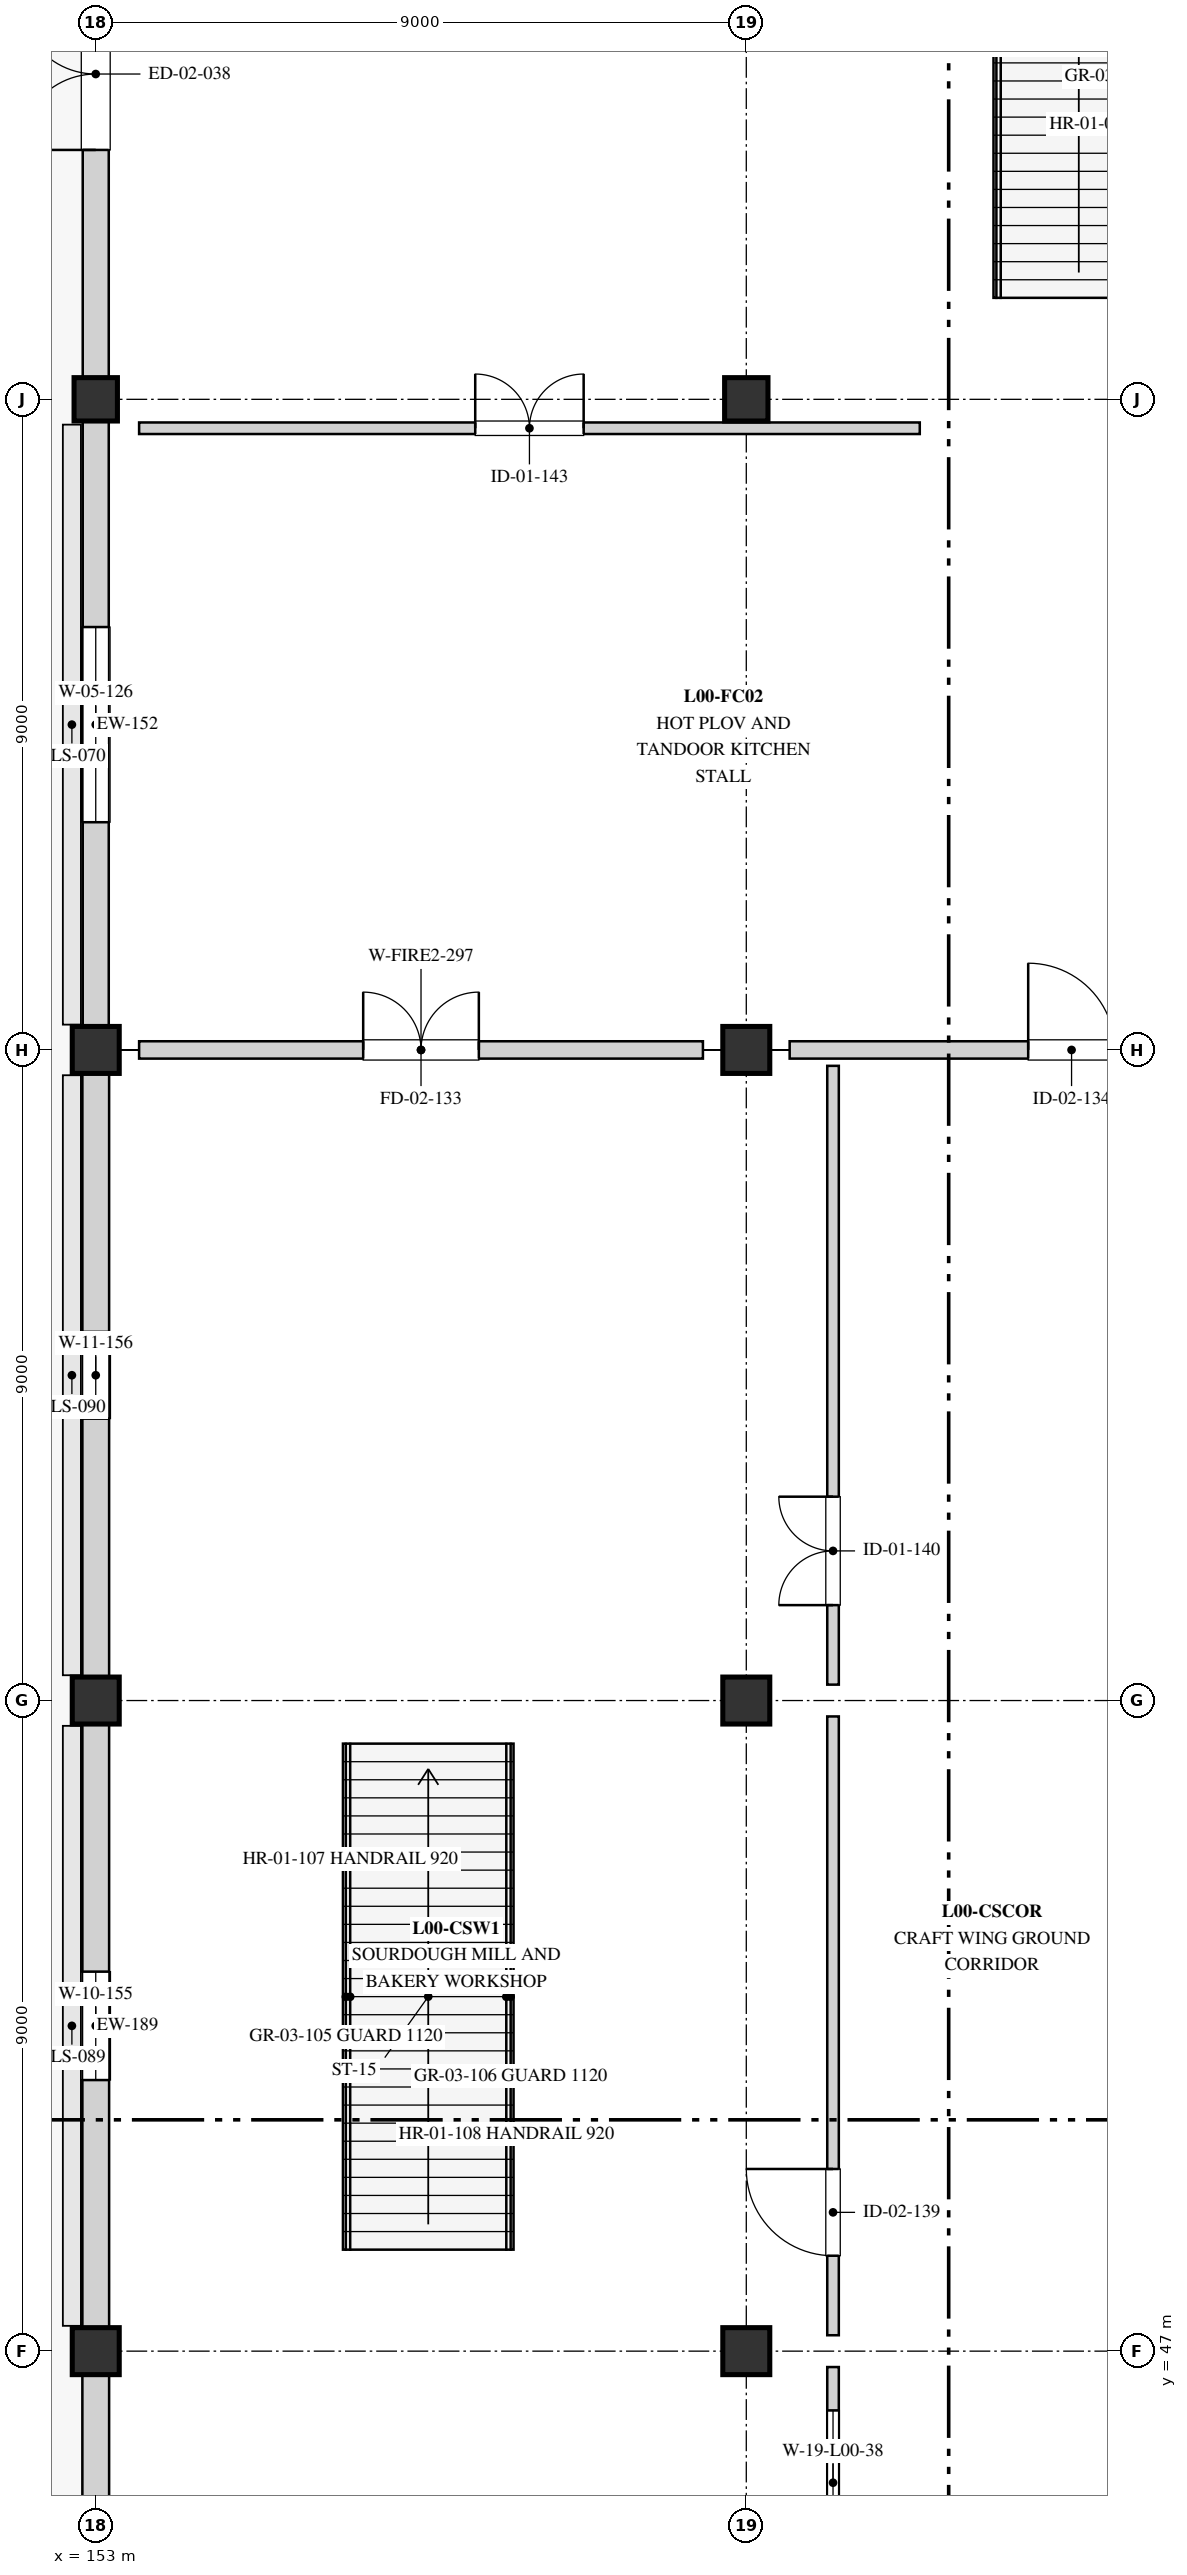
"""IFC4 building model, lengths in metres.
Left out: names, types, materials, properties, quantities, classifications, styles, units other than length and angle.
Written with IfcOpenShell. Run it as: python <this file> out.ifc"""

import sys

from ifc_helpers import new_model, si_unit, direction, frame, frame_2d, origin, origin_2d, place, context, subcontext, project, spatial, rectangle, extrude, element, fill, save


model = new_model("IFC4")
c1 = context("Model", 3, precision=1e-05, world=origin(), true_north=direction((0.0, 1.0)))
c2 = subcontext(c1, "Body", "Model", "MODEL_VIEW")
j1 = project(units=[si_unit("LENGTHUNIT", "METRE"), si_unit("PLANEANGLEUNIT", "RADIAN")], contexts=[c1])
p1 = place(None, origin())
s1 = spatial("IfcSite", under=j1, at=p1, CompositionType="ELEMENT")
p2 = place(p1, origin())
s2 = spatial("IfcBuilding", under=s1, at=p2, CompositionType="ELEMENT")
p3 = place(p2, origin())
s3 = spatial("IfcBuildingStorey", under=s2, at=p3, CompositionType="ELEMENT", Elevation=0.0)
for number, where, z_axis, x_axis in (
    (1, (153.0, 47.0, 0.0), (0.0, 0.0, 1.0), (1.0, 0.0, 0.0)),
    (2, (153.0, 56.0, 0.0), (0.0, 0.0, 1.0), (1.0, 0.0, 0.0)),
    (3, (153.0, 65.0, 0.0), (0.0, 0.0, 1.0), (1.0, 0.0, 0.0)),
):
    element("IfcColumn", number, at=place(p3, frame(where, z_axis=z_axis, x_axis=x_axis)), inside=s3, PredefinedType="COLUMN", context=c2, shape_type="SweptSolid", body=[
        extrude(rectangle(XDim=0.65, YDim=0.65, at=origin_2d()), origin(), (0.0, 0.0, 1.0), 4.5),
    ])
p4 = place(p3, frame((153.0, 74.0, 0.0), z_axis=(0.0, 0.0, 1.0), x_axis=(1.0, 0.0, 0.0)))
e4 = element("IfcColumn", 4, at=p4, inside=s3, PredefinedType="COLUMN", context=c2, shape_type="SweptSolid", body=[
    extrude(rectangle(XDim=0.6, YDim=0.6, at=origin_2d()), origin(), (0.0, 0.0, 1.0), 4.5),
])
for number, where, z_axis, x_axis in (
    (5, (162.0, 47.0, 0.0), (0.0, 0.0, 1.0), (1.0, 0.0, 0.0)),
    (6, (162.0, 56.0, 0.0), (0.0, 0.0, 1.0), (1.0, 0.0, 0.0)),
    (7, (162.0, 65.0, 0.0), (0.0, 0.0, 1.0), (1.0, 0.0, 0.0)),
):
    element("IfcColumn", number, at=place(p3, frame(where, z_axis=z_axis, x_axis=x_axis)), inside=s3, PredefinedType="COLUMN", context=c2, shape_type="SweptSolid", body=[
        extrude(rectangle(XDim=0.65, YDim=0.65, at=origin_2d()), origin(), (0.0, 0.0, 1.0), 4.5),
    ])
p5 = place(p3, frame((162.0, 74.0, 0.0), z_axis=(0.0, 0.0, 1.0), x_axis=(1.0, 0.0, 0.0)))
e8 = element("IfcColumn", 8, at=p5, inside=s3, PredefinedType="COLUMN", context=c2, shape_type="SweptSolid", body=[
    extrude(rectangle(XDim=0.6, YDim=0.6, at=origin_2d()), origin(), (0.0, 0.0, 1.0), 4.5),
])
p6 = place(p3, frame((153.0, 65.0, 0.0), z_axis=(0.0, 0.0, 1.0), x_axis=(0.0, 1.0, 0.0)))
e9 = element("IfcWall", 9, at=p6, inside=s3, PredefinedType="STANDARD", context=c2, shape_type="SweptSolid", body=[
    extrude(rectangle(XDim=9.0, YDim=0.36, at=frame_2d((4.5, 0.0))), origin(), (0.0, 0.0, 1.0), 3.36),
])
p7 = place(p6, frame((3.15, 0.0, 0.8)))
e10 = element("IfcOpeningElement", 10, at=p7, cuts=e9, PredefinedType="OPENING", context=c2, shape_type="SweptSolid", body=[
    extrude(rectangle(XDim=2.7, YDim=2.4, at=frame_2d((1.35, 1.2))), frame((0.0, 0.19, 0.0), z_axis=(0.0, -1.0, 0.0), x_axis=(1.0, 0.0, 0.0)), (0.0, 0.0, 1.0), 0.38),
])
p8 = place(p3, frame((153.0, 74.0, 0.0), z_axis=(0.0, 0.0, 1.0), x_axis=(0.0, 1.0, 0.0)))
e11 = element("IfcWall", 11, at=p8, inside=s3, PredefinedType="STANDARD", context=c2, shape_type="SweptSolid", body=[
    extrude(rectangle(XDim=9.0, YDim=0.36, at=frame_2d((4.5, 0.0))), origin(), (0.0, 0.0, 1.0), 3.36),
])
p9 = place(p8, frame((3.45, 0.0, 0.0)))
e12 = element("IfcOpeningElement", 12, at=p9, cuts=e11, PredefinedType="OPENING", context=c2, shape_type="SweptSolid", body=[
    extrude(rectangle(XDim=2.1, YDim=2.5, at=frame_2d((1.05, 1.25))), frame((0.0, 0.19, 0.0), z_axis=(0.0, -1.0, 0.0), x_axis=(1.0, 0.0, 0.0)), (0.0, 0.0, 1.0), 0.38),
])
p10 = place(p3, frame((153.0, 38.0, 0.0), z_axis=(0.0, 0.0, 1.0), x_axis=(0.0, 1.0, 0.0)))
e13 = element("IfcWall", 13, at=p10, inside=s3, PredefinedType="STANDARD", context=c2, shape_type="SweptSolid", body=[
    extrude(rectangle(XDim=9.0, YDim=0.37, at=frame_2d((4.5, 0.0))), origin(), (0.0, 0.0, 1.0), 3.38),
])
p11 = place(p10, frame((3.6, 0.0, 0.0)))
e14 = element("IfcOpeningElement", 14, at=p11, cuts=e13, PredefinedType="OPENING", context=c2, shape_type="SweptSolid", body=[
    extrude(rectangle(XDim=1.05, YDim=2.15, at=frame_2d((0.525, 1.075))), frame((0.0, 0.195, 0.0), z_axis=(0.0, -1.0, 0.0), x_axis=(1.0, 0.0, 0.0)), (0.0, 0.0, 1.0), 0.39),
])
p12 = place(p3, frame((153.0, 47.0, 0.0), z_axis=(0.0, 0.0, 1.0), x_axis=(0.0, 1.0, 0.0)))
e15 = element("IfcWall", 15, at=p12, inside=s3, PredefinedType="STANDARD", context=c2, shape_type="SweptSolid", body=[
    extrude(rectangle(XDim=9.0, YDim=0.37, at=frame_2d((4.5, 0.0))), origin(), (0.0, 0.0, 1.0), 3.38),
])
p13 = place(p12, frame((3.75, 0.0, 0.9)))
e16 = element("IfcOpeningElement", 16, at=p13, cuts=e15, PredefinedType="OPENING", context=c2, shape_type="SweptSolid", body=[
    extrude(rectangle(XDim=1.5, YDim=1.8, at=frame_2d((0.75, 0.9))), frame((0.0, 0.195, 0.0), z_axis=(0.0, -1.0, 0.0), x_axis=(1.0, 0.0, 0.0)), (0.0, 0.0, 1.0), 0.39),
])
p14 = place(p3, frame((153.0, 56.0, 0.0), z_axis=(0.0, 0.0, 1.0), x_axis=(0.0, 1.0, 0.0)))
e17 = element("IfcWall", 17, at=p14, inside=s3, PredefinedType="STANDARD", context=c2, shape_type="SweptSolid", body=[
    extrude(rectangle(XDim=9.0, YDim=0.37, at=frame_2d((4.5, 0.0))), origin(), (0.0, 0.0, 1.0), 3.36),
])
p15 = place(p14, frame((3.9, 0.0, 0.9)))
e18 = element("IfcOpeningElement", 18, at=p15, cuts=e17, PredefinedType="OPENING", context=c2, shape_type="SweptSolid", body=[
    extrude(rectangle(XDim=1.2, YDim=1.8, at=frame_2d((0.6, 0.9))), frame((0.0, 0.195, 0.0), z_axis=(0.0, -1.0, 0.0), x_axis=(1.0, 0.0, 0.0)), (0.0, 0.0, 1.0), 0.39),
])
p16 = place(p3, frame((153.6, 65.0, 0.0), z_axis=(0.0, 0.0, 1.0), x_axis=(1.0, 0.0, 0.0)))
e19 = element("IfcWall", 19, at=p16, inside=s3, PredefinedType="SOLIDWALL", context=c2, shape_type="SweptSolid", body=[
    extrude(rectangle(XDim=7.8, YDim=0.24, at=frame_2d((3.9, 0.0))), origin(), (0.0, 0.0, 1.0), 3.2),
])
p17 = place(p16, frame((3.1, 0.0, 0.0)))
e20 = element("IfcOpeningElement", 20, at=p17, cuts=e19, PredefinedType="OPENING", context=c2, shape_type="SweptSolid", body=[
    extrude(rectangle(XDim=1.6, YDim=2.2, at=frame_2d((0.8, 1.1))), frame((0.0, 0.13, 0.0), z_axis=(0.0, -1.0, 0.0), x_axis=(1.0, 0.0, 0.0)), (0.0, 0.0, 1.0), 0.26),
])
p18 = place(p3, frame((162.6, 65.0, 0.0), z_axis=(0.0, 0.0, 1.0), x_axis=(1.0, 0.0, 0.0)))
e21 = element("IfcWall", 21, at=p18, inside=s3, PredefinedType="SOLIDWALL", context=c2, shape_type="SweptSolid", body=[
    extrude(rectangle(XDim=7.8, YDim=0.24, at=frame_2d((3.9, 0.0))), origin(), (0.0, 0.0, 1.0), 3.2),
])
p19 = place(p18, frame((3.3, 0.0, 0.0)))
e22 = element("IfcOpeningElement", 22, at=p19, cuts=e21, PredefinedType="OPENING", context=c2, shape_type="SweptSolid", body=[
    extrude(rectangle(XDim=1.2, YDim=2.15, at=frame_2d((0.6, 1.075))), frame((0.0, 0.13, 0.0), z_axis=(0.0, -1.0, 0.0), x_axis=(1.0, 0.0, 0.0)), (0.0, 0.0, 1.0), 0.26),
])
p20 = place(p3, frame((163.2, 38.22, 0.0), z_axis=(0.0, 0.0, 1.0), x_axis=(0.0, 1.0, 0.0)))
e23 = element("IfcWall", 23, at=p20, inside=s3, PredefinedType="PARTITIONING", context=c2, shape_type="SweptSolid", body=[
    extrude(rectangle(XDim=8.56, YDim=0.16, at=frame_2d((4.28, 0.0))), origin(), (0.0, 0.0, 1.0), 3.2),
])
p21 = place(p20, frame((1.1, 0.0, 0.0)))
e24 = element("IfcOpeningElement", 24, at=p21, cuts=e23, PredefinedType="OPENING", context=c2, shape_type="SweptSolid", body=[
    extrude(rectangle(XDim=1.2, YDim=2.15, at=frame_2d((0.6, 1.075))), frame((0.0, 0.09, 0.0), z_axis=(0.0, -1.0, 0.0), x_axis=(1.0, 0.0, 0.0)), (0.0, 0.0, 1.0), 0.18),
])
p22 = place(p20, frame((5.96, 0.0, 1.05)))
e25 = element("IfcOpeningElement", 25, at=p22, cuts=e23, PredefinedType="OPENING", context=c2, shape_type="SweptSolid", body=[
    extrude(rectangle(XDim=2.0, YDim=1.35, at=frame_2d((1.0, 0.675))), frame((0.0, 0.09, 0.0), z_axis=(0.0, -1.0, 0.0), x_axis=(1.0, 0.0, 0.0)), (0.0, 0.0, 1.0), 0.18),
])
p23 = place(p3, frame((163.2, 47.22, 0.0), z_axis=(0.0, 0.0, 1.0), x_axis=(0.0, 1.0, 0.0)))
e26 = element("IfcWall", 26, at=p23, inside=s3, PredefinedType="PARTITIONING", context=c2, shape_type="SweptSolid", body=[
    extrude(rectangle(XDim=8.56, YDim=0.16, at=frame_2d((4.28, 0.0))), origin(), (0.0, 0.0, 1.0), 3.2),
])
p24 = place(p23, frame((1.1, 0.0, 0.0)))
e27 = element("IfcOpeningElement", 27, at=p24, cuts=e26, PredefinedType="OPENING", context=c2, shape_type="SweptSolid", body=[
    extrude(rectangle(XDim=1.2, YDim=2.15, at=frame_2d((0.6, 1.075))), frame((0.0, 0.09, 0.0), z_axis=(0.0, -1.0, 0.0), x_axis=(1.0, 0.0, 0.0)), (0.0, 0.0, 1.0), 0.18),
])
p25 = place(p3, frame((163.2, 56.22, 0.0), z_axis=(0.0, 0.0, 1.0), x_axis=(0.0, 1.0, 0.0)))
e28 = element("IfcWall", 28, at=p25, inside=s3, PredefinedType="PARTITIONING", context=c2, shape_type="SweptSolid", body=[
    extrude(rectangle(XDim=8.56, YDim=0.16, at=frame_2d((4.28, 0.0))), origin(), (0.0, 0.0, 1.0), 3.2),
])
p26 = place(p25, frame((1.1, 0.0, 0.0)))
e29 = element("IfcOpeningElement", 29, at=p26, cuts=e28, PredefinedType="OPENING", context=c2, shape_type="SweptSolid", body=[
    extrude(rectangle(XDim=1.5, YDim=2.25, at=frame_2d((0.75, 1.125))), frame((0.0, 0.09, 0.0), z_axis=(0.0, -1.0, 0.0), x_axis=(1.0, 0.0, 0.0)), (0.0, 0.0, 1.0), 0.18),
])
p27 = place(p3, frame((153.6, 73.6, 0.0), z_axis=(0.0, 0.0, 1.0), x_axis=(1.0, 0.0, 0.0)))
e30 = element("IfcWall", 30, at=p27, inside=s3, PredefinedType="PARTITIONING", context=c2, shape_type="SweptSolid", body=[
    extrude(rectangle(XDim=10.8, YDim=0.16, at=frame_2d((5.4, 0.0))), origin(), (0.0, 0.0, 1.0), 3.2),
])
p28 = place(p27, frame((4.65, 0.0, 0.0)))
e31 = element("IfcOpeningElement", 31, at=p28, cuts=e30, PredefinedType="OPENING", context=c2, shape_type="SweptSolid", body=[
    extrude(rectangle(XDim=1.5, YDim=2.25, at=frame_2d((0.75, 1.125))), frame((0.0, 0.09, 0.0), z_axis=(0.0, -1.0, 0.0), x_axis=(1.0, 0.0, 0.0)), (0.0, 0.0, 1.0), 0.18),
])
p29 = place(p7, origin())
e32 = element("IfcWindow", 32, at=p29, inside=s3, PartitioningType="SINGLE_PANEL", PredefinedType="WINDOW", context=c2, shape_type="SweptSolid", body=[
    extrude(rectangle(XDim=2.7, YDim=2.4, at=frame_2d((1.35, 1.2))), frame((0.0, 0.03, 0.0), z_axis=(0.0, -1.0, 0.0), x_axis=(1.0, 0.0, 0.0)), (0.0, 0.0, 1.0), 0.06),
])
fill(e10, e32)
p30 = place(p9, origin())
e33 = element("IfcDoor", 33, at=p30, inside=s3, OperationType="DOUBLE_DOOR_SINGLE_SWING", PredefinedType="DOOR", context=c2, shape_type="SweptSolid", body=[
    extrude(rectangle(XDim=2.1, YDim=2.5, at=frame_2d((1.05, 1.25))), frame((0.0, 0.025, 0.0), z_axis=(0.0, -1.0, 0.0), x_axis=(1.0, 0.0, 0.0)), (0.0, 0.0, 1.0), 0.05),
])
fill(e12, e33)
p31 = place(p13, origin())
e34 = element("IfcWindow", 34, at=p31, inside=s3, PartitioningType="SINGLE_PANEL", PredefinedType="WINDOW", context=c2, shape_type="SweptSolid", body=[
    extrude(rectangle(XDim=1.5, YDim=1.8, at=frame_2d((0.75, 0.9))), frame((0.0, 0.03, 0.0), z_axis=(0.0, -1.0, 0.0), x_axis=(1.0, 0.0, 0.0)), (0.0, 0.0, 1.0), 0.06),
])
fill(e16, e34)
p32 = place(p15, origin())
e35 = element("IfcWindow", 35, at=p32, inside=s3, PartitioningType="SINGLE_PANEL", PredefinedType="WINDOW", context=c2, shape_type="SweptSolid", body=[
    extrude(rectangle(XDim=1.2, YDim=1.8, at=frame_2d((0.6, 0.9))), frame((0.0, 0.03, 0.0), z_axis=(0.0, -1.0, 0.0), x_axis=(1.0, 0.0, 0.0)), (0.0, 0.0, 1.0), 0.06),
])
fill(e18, e35)
p33 = place(p17, origin())
e36 = element("IfcDoor", 36, at=p33, inside=s3, OperationType="DOUBLE_DOOR_SINGLE_SWING", PredefinedType="DOOR", context=c2, shape_type="SweptSolid", body=[
    extrude(rectangle(XDim=1.6, YDim=2.2, at=frame_2d((0.8, 1.1))), frame((0.0, 0.025, 0.0), z_axis=(0.0, -1.0, 0.0), x_axis=(1.0, 0.0, 0.0)), (0.0, 0.0, 1.0), 0.05),
])
fill(e20, e36)
p34 = place(p19, origin())
e37 = element("IfcDoor", 37, at=p34, inside=s3, OperationType="SINGLE_SWING_LEFT", PredefinedType="DOOR", context=c2, shape_type="SweptSolid", body=[
    extrude(rectangle(XDim=1.2, YDim=2.15, at=frame_2d((0.6, 1.075))), frame((0.0, 0.025, 0.0), z_axis=(0.0, -1.0, 0.0), x_axis=(1.0, 0.0, 0.0)), (0.0, 0.0, 1.0), 0.05),
])
fill(e22, e37)
p35 = place(p22, origin())
e38 = element("IfcWindow", 38, at=p35, inside=s3, PartitioningType="SINGLE_PANEL", PredefinedType="WINDOW", context=c2, shape_type="SweptSolid", body=[
    extrude(rectangle(XDim=2.0, YDim=1.35, at=frame_2d((1.0, 0.675))), frame((0.0, 0.03, 0.0), z_axis=(0.0, -1.0, 0.0), x_axis=(1.0, 0.0, 0.0)), (0.0, 0.0, 1.0), 0.06),
])
fill(e25, e38)
p36 = place(p24, origin())
e39 = element("IfcDoor", 39, at=p36, inside=s3, OperationType="SINGLE_SWING_RIGHT", PredefinedType="DOOR", context=c2, shape_type="SweptSolid", body=[
    extrude(rectangle(XDim=1.2, YDim=2.15, at=frame_2d((0.6, 1.075))), frame((0.0, 0.025, 0.0), z_axis=(0.0, -1.0, 0.0), x_axis=(1.0, 0.0, 0.0)), (0.0, 0.0, 1.0), 0.05),
])
fill(e27, e39)
p37 = place(p26, origin())
e40 = element("IfcDoor", 40, at=p37, inside=s3, OperationType="DOUBLE_DOOR_SINGLE_SWING", PredefinedType="DOOR", context=c2, shape_type="SweptSolid", body=[
    extrude(rectangle(XDim=1.5, YDim=2.25, at=frame_2d((0.75, 1.125))), frame((0.0, 0.025, 0.0), z_axis=(0.0, -1.0, 0.0), x_axis=(1.0, 0.0, 0.0)), (0.0, 0.0, 1.0), 0.05),
])
fill(e29, e40)
p38 = place(p28, origin())
e41 = element("IfcDoor", 41, at=p38, inside=s3, OperationType="DOUBLE_DOOR_SINGLE_SWING", PredefinedType="DOOR", context=c2, shape_type="SweptSolid", body=[
    extrude(rectangle(XDim=1.5, YDim=2.25, at=frame_2d((0.75, 1.125))), frame((0.0, 0.025, 0.0), z_axis=(0.0, -1.0, 0.0), x_axis=(1.0, 0.0, 0.0)), (0.0, 0.0, 1.0), 0.05),
])
fill(e31, e41)
save(model, sys.argv[1])
